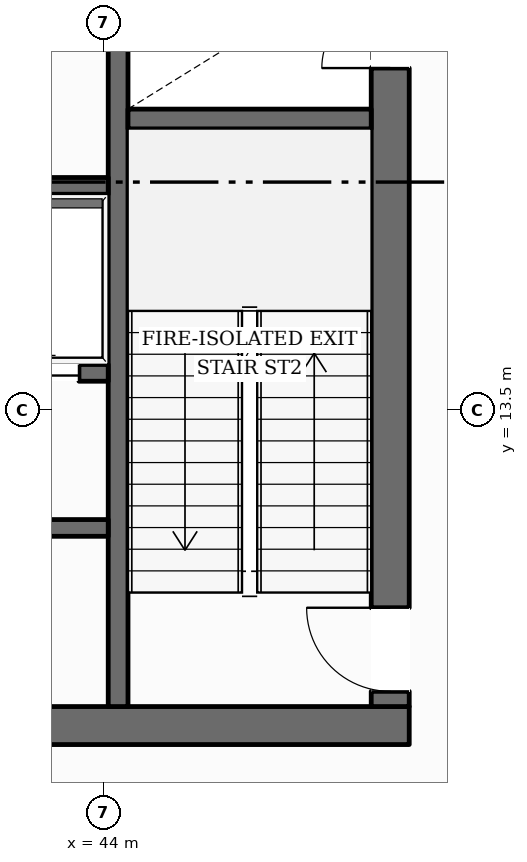
"""IFC4 building model, lengths in metres.
Left out: names, types, materials, properties, quantities, classifications, styles, units other than length and angle.
Written with IfcOpenShell. Run it as: python <this file> out.ifc"""

import sys

from ifc_helpers import new_model, si_unit, direction, frame, frame_2d, origin, place, context, subcontext, project, spatial, rectangle, extrude, element, fill, save


model = new_model("IFC4")
c1 = context("Model", 3, precision=1e-05, world=origin(), true_north=direction((0.0, 1.0)))
c2 = subcontext(c1, "Body", "Model", "MODEL_VIEW")
j1 = project(units=[si_unit("LENGTHUNIT", "METRE"), si_unit("PLANEANGLEUNIT", "RADIAN")], contexts=[c1])
p1 = place(None, origin())
s1 = spatial("IfcSite", under=j1, at=p1, CompositionType="ELEMENT")
p2 = place(p1, origin())
s2 = spatial("IfcBuilding", under=s1, at=p2, CompositionType="ELEMENT")
p3 = place(p2, frame((0.0, 0.0, 80.5)))
s3 = spatial("IfcBuildingStorey", under=s2, at=p3, CompositionType="ELEMENT", Elevation=80.5)
p4 = place(p3, frame((27.98, 9.35, 0.0), z_axis=(0.0, 0.0, 1.0), x_axis=(1.0, 0.0, 0.0)))
e1 = element("IfcWall", 1, at=p4, inside=s3, PredefinedType="SOLIDWALL", context=c2, shape_type="SweptSolid", body=[
    extrude(rectangle(XDim=20.04, YDim=0.5, at=frame_2d((10.02, 0.0))), origin(), (0.0, 0.0, 1.0), 4.75),
])
p5 = place(p4, frame((10.52, 0.0, 0.0)))
e2 = element("IfcOpeningElement", 2, at=p5, cuts=e1, PredefinedType="OPENING", context=c2, shape_type="SweptSolid", body=[
    extrude(rectangle(XDim=1.4, YDim=2.2, at=frame_2d((0.7, 1.1))), frame((0.0, 0.26, 0.0), z_axis=(0.0, -1.0, 0.0), x_axis=(1.0, 0.0, 0.0)), (0.0, 0.0, 1.0), 0.52),
])
p6 = place(p3, frame((47.77, 9.6, 0.0), z_axis=(0.0, 0.0, 1.0), x_axis=(0.0, 1.0, 0.0)))
e3 = element("IfcWall", 3, at=p6, inside=s3, PredefinedType="SOLIDWALL", context=c2, shape_type="SweptSolid", body=[
    extrude(rectangle(XDim=13.0, YDim=0.5, at=frame_2d((6.5, 0.0))), origin(), (0.0, 0.0, 1.0), 4.75),
])
p7 = place(p6, frame((0.2, 0.0, 0.0)))
e4 = element("IfcOpeningElement", 4, at=p7, cuts=e3, PredefinedType="OPENING", context=c2, shape_type="SweptSolid", body=[
    extrude(rectangle(XDim=1.1, YDim=2.15, at=frame_2d((0.55, 1.075))), frame((0.0, 0.26, 0.0), z_axis=(0.0, -1.0, 0.0), x_axis=(1.0, 0.0, 0.0)), (0.0, 0.0, 1.0), 0.52),
])
p8 = place(p6, frame((8.4, 0.0, 0.0)))
e5 = element("IfcOpeningElement", 5, at=p8, cuts=e3, PredefinedType="OPENING", context=c2, shape_type="SweptSolid", body=[
    extrude(rectangle(XDim=0.9, YDim=2.1, at=frame_2d((0.45, 1.05))), frame((0.0, 0.26, 0.0), z_axis=(0.0, -1.0, 0.0), x_axis=(1.0, 0.0, 0.0)), (0.0, 0.0, 1.0), 0.52),
])
p9 = place(p3, frame((44.19, 9.6, 0.0), z_axis=(0.0, 0.0, 1.0), x_axis=(0.0, 1.0, 0.0)))
e6 = element("IfcWall", 6, at=p9, inside=s3, PredefinedType="SHEAR", context=c2, shape_type="SweptSolid", body=[
    extrude(rectangle(XDim=13.0, YDim=0.26, at=frame_2d((6.5, 0.0))), origin(), (0.0, 0.0, 1.0), 4.75),
])
p10 = place(p9, frame((10.925, 0.0, 0.0)))
e7 = element("IfcOpeningElement", 7, at=p10, cuts=e6, PredefinedType="OPENING", context=c2, shape_type="SweptSolid", body=[
    extrude(rectangle(XDim=1.25, YDim=2.25, at=frame_2d((0.625, 1.125))), frame((0.0, 0.14, 0.0), z_axis=(0.0, -1.0, 0.0), x_axis=(1.0, 0.0, 0.0)), (0.0, 0.0, 1.0), 0.28),
])
p11 = place(p3, frame((44.32, 17.33, 0.0), z_axis=(0.0, 0.0, 1.0), x_axis=(1.0, 0.0, 0.0)))
e8 = element("IfcWall", 8, at=p11, inside=s3, PredefinedType="SHEAR", context=c2, shape_type="SweptSolid", body=[
    extrude(rectangle(XDim=3.2, YDim=0.26, at=frame_2d((1.6, 0.0))), origin(), (0.0, 0.0, 1.0), 4.75),
])
p12 = place(p3, frame((31.94, 16.45, 0.0), z_axis=(0.0, 0.0, 1.0), x_axis=(1.0, 0.0, 0.0)))
e9 = element("IfcWall", 9, at=p12, inside=s3, PredefinedType="SOLIDWALL", context=c2, shape_type="SweptSolid", body=[
    extrude(rectangle(XDim=12.12, YDim=0.22, at=frame_2d((6.06, 0.0))), origin(), (0.0, 0.0, 1.0), 4.75),
])
p13 = place(p3, frame((31.94, 13.99, 0.0), z_axis=(0.0, 0.0, 1.0), x_axis=(1.0, 0.0, 0.0)))
e10 = element("IfcWall", 10, at=p13, inside=s3, PredefinedType="SOLIDWALL", context=c2, shape_type="SweptSolid", body=[
    extrude(rectangle(XDim=12.12, YDim=0.22, at=frame_2d((6.06, 0.0))), origin(), (0.0, 0.0, 1.0), 4.75),
])
p14 = place(p13, frame((0.385, 0.0, 0.0)))
e11 = element("IfcOpeningElement", 11, at=p14, cuts=e10, PredefinedType="OPENING", context=c2, shape_type="SweptSolid", body=[
    extrude(rectangle(XDim=1.1, YDim=2.2, at=frame_2d((0.55, 1.1))), frame((0.0, 0.12, 0.0), z_axis=(0.0, -1.0, 0.0), x_axis=(1.0, 0.0, 0.0)), (0.0, 0.0, 1.0), 0.24),
])
p15 = place(p13, frame((2.435, 0.0, 0.0)))
e12 = element("IfcOpeningElement", 12, at=p15, cuts=e10, PredefinedType="OPENING", context=c2, shape_type="SweptSolid", body=[
    extrude(rectangle(XDim=1.1, YDim=2.2, at=frame_2d((0.55, 1.1))), frame((0.0, 0.12, 0.0), z_axis=(0.0, -1.0, 0.0), x_axis=(1.0, 0.0, 0.0)), (0.0, 0.0, 1.0), 0.24),
])
p16 = place(p13, frame((4.485, 0.0, 0.0)))
e13 = element("IfcOpeningElement", 13, at=p16, cuts=e10, PredefinedType="OPENING", context=c2, shape_type="SweptSolid", body=[
    extrude(rectangle(XDim=1.1, YDim=2.2, at=frame_2d((0.55, 1.1))), frame((0.0, 0.12, 0.0), z_axis=(0.0, -1.0, 0.0), x_axis=(1.0, 0.0, 0.0)), (0.0, 0.0, 1.0), 0.24),
])
p17 = place(p13, frame((6.535, 0.0, 0.0)))
e14 = element("IfcOpeningElement", 14, at=p17, cuts=e10, PredefinedType="OPENING", context=c2, shape_type="SweptSolid", body=[
    extrude(rectangle(XDim=1.1, YDim=2.2, at=frame_2d((0.55, 1.1))), frame((0.0, 0.12, 0.0), z_axis=(0.0, -1.0, 0.0), x_axis=(1.0, 0.0, 0.0)), (0.0, 0.0, 1.0), 0.24),
])
p18 = place(p13, frame((8.585, 0.0, 0.0)))
e15 = element("IfcOpeningElement", 15, at=p18, cuts=e10, PredefinedType="OPENING", context=c2, shape_type="SweptSolid", body=[
    extrude(rectangle(XDim=1.1, YDim=2.2, at=frame_2d((0.55, 1.1))), frame((0.0, 0.12, 0.0), z_axis=(0.0, -1.0, 0.0), x_axis=(1.0, 0.0, 0.0)), (0.0, 0.0, 1.0), 0.24),
])
p19 = place(p13, frame((10.635, 0.0, 0.0)))
e16 = element("IfcOpeningElement", 16, at=p19, cuts=e10, PredefinedType="OPENING", context=c2, shape_type="SweptSolid", body=[
    extrude(rectangle(XDim=1.1, YDim=2.2, at=frame_2d((0.55, 1.1))), frame((0.0, 0.12, 0.0), z_axis=(0.0, -1.0, 0.0), x_axis=(1.0, 0.0, 0.0)), (0.0, 0.0, 1.0), 0.24),
])
p20 = place(p3, frame((40.28, 11.95, 0.0), z_axis=(0.0, 0.0, 1.0), x_axis=(1.0, 0.0, 0.0)))
e17 = element("IfcWall", 17, at=p20, inside=s3, PredefinedType="SOLIDWALL", context=c2, shape_type="SweptSolid", body=[
    extrude(rectangle(XDim=3.78, YDim=0.22, at=frame_2d((1.89, 0.0))), origin(), (0.0, 0.0, 1.0), 4.75),
])
p21 = place(p20, frame((1.55, 0.0, 0.0)))
e18 = element("IfcOpeningElement", 18, at=p21, cuts=e17, PredefinedType="OPENING", context=c2, shape_type="SweptSolid", body=[
    extrude(rectangle(XDim=0.9, YDim=2.1, at=frame_2d((0.45, 1.05))), frame((0.0, 0.12, 0.0), z_axis=(0.0, -1.0, 0.0), x_axis=(1.0, 0.0, 0.0)), (0.0, 0.0, 1.0), 0.24),
])
p22 = place(p3, frame((44.389, 44.257, 0.0), z_axis=(0.0, 0.0, 1.0), x_axis=(0.495210354805, -0.868773102999, 0.0)))
e19 = element("IfcWall", 19, at=p22, inside=s3, PredefinedType="STANDARD", context=c2, shape_type="SweptSolid", body=[
    extrude(rectangle(XDim=35.035, YDim=0.38, at=frame_2d((17.518, 0.0))), origin(), (0.0, 0.0, 1.0), 4.209),
])
p23 = place(p22, frame((30.72, 0.0, 0.65)))
e20 = element("IfcOpeningElement", 20, at=p23, cuts=e19, PredefinedType="OPENING", context=c2, shape_type="SweptSolid", body=[
    extrude(rectangle(XDim=2.0, YDim=2.25, at=frame_2d((1.0, 1.125))), frame((0.0, 0.2, 0.0), z_axis=(0.0, -1.0, 0.0), x_axis=(1.0, 0.0, 0.0)), (0.0, 0.0, 1.0), 0.4),
])
p24 = place(p22, frame((2.321, 0.0, 0.65)))
e21 = element("IfcOpeningElement", 21, at=p24, cuts=e19, PredefinedType="OPENING", context=c2, shape_type="SweptSolid", body=[
    extrude(rectangle(XDim=2.0, YDim=2.25, at=frame_2d((1.0, 1.125))), frame((0.0, 0.2, 0.0), z_axis=(0.0, -1.0, 0.0), x_axis=(1.0, 0.0, 0.0)), (0.0, 0.0, 1.0), 0.4),
])
p25 = place(p7, origin())
e22 = element("IfcDoor", 22, at=p25, inside=s3, OperationType="SINGLE_SWING_RIGHT", PredefinedType="DOOR", context=c2, shape_type="SweptSolid", body=[
    extrude(rectangle(XDim=1.1, YDim=2.15, at=frame_2d((0.55, 1.075))), frame((0.0, 0.025, 0.0), z_axis=(0.0, -1.0, 0.0), x_axis=(1.0, 0.0, 0.0)), (0.0, 0.0, 1.0), 0.05),
])
fill(e4, e22)
p26 = place(p8, origin())
e23 = element("IfcDoor", 23, at=p26, inside=s3, OperationType="SINGLE_SWING_LEFT", PredefinedType="DOOR", context=c2, shape_type="SweptSolid", body=[
    extrude(rectangle(XDim=0.9, YDim=2.1, at=frame_2d((0.45, 1.05))), frame((0.0, 0.025, 0.0), z_axis=(0.0, -1.0, 0.0), x_axis=(1.0, 0.0, 0.0)), (0.0, 0.0, 1.0), 0.05),
])
fill(e5, e23)
p27 = place(p19, origin())
e24 = element("IfcDoor", 24, at=p27, inside=s3, OperationType="DOUBLE_DOOR_SLIDING", PredefinedType="DOOR", context=c2, shape_type="SweptSolid", body=[
    extrude(rectangle(XDim=1.1, YDim=2.2, at=frame_2d((0.55, 1.1))), frame((0.0, 0.025, 0.0), z_axis=(0.0, -1.0, 0.0), x_axis=(1.0, 0.0, 0.0)), (0.0, 0.0, 1.0), 0.05),
])
fill(e16, e24)
save(model, sys.argv[1])
